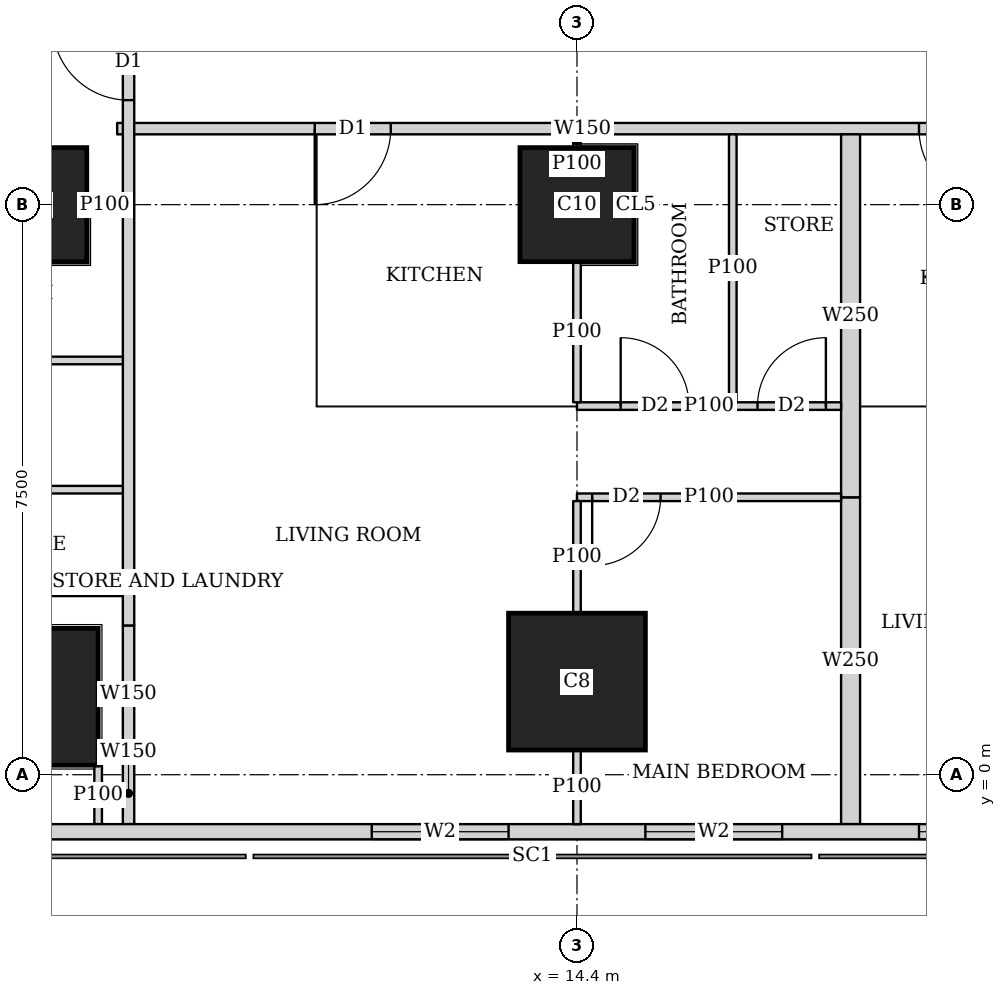
"""IFC4 building model, lengths in metres.
Left out: names, types, materials, properties, quantities, classifications, styles, units other than length and angle.
Written with IfcOpenShell. Run it as: python <this file> out.ifc"""

import sys

from ifc_helpers import new_model, si_unit, direction, frame, frame_2d, origin, origin_2d, place, context, subcontext, project, spatial, rectangle, extrude, element, fill, save


model = new_model("IFC4")
c1 = context("Model", 3, precision=1e-05, world=origin(), true_north=direction((0.0, 1.0)))
c2 = subcontext(c1, "Body", "Model", "MODEL_VIEW")
j1 = project(units=[si_unit("LENGTHUNIT", "METRE"), si_unit("PLANEANGLEUNIT", "RADIAN")], contexts=[c1])
p1 = place(None, origin())
s1 = spatial("IfcSite", under=j1, at=p1, CompositionType="ELEMENT")
p2 = place(p1, origin())
s2 = spatial("IfcBuilding", under=s1, at=p2, CompositionType="ELEMENT")
p3 = place(p2, frame((0.0, 0.0, 135.8)))
s3 = spatial("IfcBuildingStorey", under=s2, at=p3, CompositionType="ELEMENT", Elevation=135.8)
for number, where, z_axis, x_axis in (
    (1, (7.2, 1.025, 0.0), (0.0, 0.0, 1.0), (1.0, 0.0, 0.0)),
    (2, (14.4, 1.225, 0.0), (0.0, 0.0, 1.0), (1.0, 0.0, 0.0)),
):
    element("IfcColumn", number, at=place(p3, frame(where, z_axis=z_axis, x_axis=x_axis)), inside=s3, PredefinedType="COLUMN", context=c2, shape_type="SweptSolid", body=[
        extrude(rectangle(XDim=1.8, YDim=1.8, at=origin_2d()), origin(), (0.0, 0.0, 1.0), 3.75),
    ])
for number, where, z_axis, x_axis in (
    (3, (7.2, 7.5, 0.0), (0.0, 0.0, 1.0), (1.0, 0.0, 0.0)),
    (4, (14.4, 7.5, 0.0), (0.0, 0.0, 1.0), (1.0, 0.0, 0.0)),
):
    element("IfcColumn", number, at=place(p3, frame(where, z_axis=z_axis, x_axis=x_axis)), inside=s3, PredefinedType="COLUMN", context=c2, shape_type="SweptSolid", body=[
        extrude(rectangle(XDim=1.5, YDim=1.5, at=origin_2d()), origin(), (0.0, 0.0, 1.0), 3.75),
    ])
p4 = place(p3, frame((2.163, -0.75, 0.0), z_axis=(0.0, 0.0, 1.0), x_axis=(1.0, 0.0, 0.0)))
e5 = element("IfcWall", 5, at=p4, inside=s3, PredefinedType="SOLIDWALL", context=c2, shape_type="SweptSolid", body=[
    extrude(rectangle(XDim=45.628, YDim=0.2, at=frame_2d((22.814, 0.0))), origin(), (0.0, 0.0, 1.0), 3.5),
])
p5 = place(p4, frame((9.537, 0.0, 0.9)))
e6 = element("IfcOpeningElement", 6, at=p5, cuts=e5, PredefinedType="OPENING", context=c2, shape_type="SweptSolid", body=[
    extrude(rectangle(XDim=1.8, YDim=1.5, at=frame_2d((0.9, 0.75))), frame((0.0, 0.11, 0.0), z_axis=(0.0, -1.0, 0.0), x_axis=(1.0, 0.0, 0.0)), (0.0, 0.0, 1.0), 0.22),
])
p6 = place(p4, frame((13.137, 0.0, 0.9)))
e7 = element("IfcOpeningElement", 7, at=p6, cuts=e5, PredefinedType="OPENING", context=c2, shape_type="SweptSolid", body=[
    extrude(rectangle(XDim=1.8, YDim=1.5, at=frame_2d((0.9, 0.75))), frame((0.0, 0.11, 0.0), z_axis=(0.0, -1.0, 0.0), x_axis=(1.0, 0.0, 0.0)), (0.0, 0.0, 1.0), 0.22),
])
p7 = place(p4, frame((16.737, 0.0, 0.9)))
e8 = element("IfcOpeningElement", 8, at=p7, cuts=e5, PredefinedType="OPENING", context=c2, shape_type="SweptSolid", body=[
    extrude(rectangle(XDim=1.8, YDim=1.5, at=frame_2d((0.9, 0.75))), frame((0.0, 0.11, 0.0), z_axis=(0.0, -1.0, 0.0), x_axis=(1.0, 0.0, 0.0)), (0.0, 0.0, 1.0), 0.22),
])
p8 = place(p4, frame((20.337, 0.0, 0.9)))
e9 = element("IfcOpeningElement", 9, at=p8, cuts=e5, PredefinedType="OPENING", context=c2, shape_type="SweptSolid", body=[
    extrude(rectangle(XDim=1.8, YDim=1.5, at=frame_2d((0.9, 0.75))), frame((0.0, 0.11, 0.0), z_axis=(0.0, -1.0, 0.0), x_axis=(1.0, 0.0, 0.0)), (0.0, 0.0, 1.0), 0.22),
])
p9 = place(p4, frame((23.937, 0.0, 0.9)))
e10 = element("IfcOpeningElement", 10, at=p9, cuts=e5, PredefinedType="OPENING", context=c2, shape_type="SweptSolid", body=[
    extrude(rectangle(XDim=1.8, YDim=1.5, at=frame_2d((0.9, 0.75))), frame((0.0, 0.11, 0.0), z_axis=(0.0, -1.0, 0.0), x_axis=(1.0, 0.0, 0.0)), (0.0, 0.0, 1.0), 0.22),
])
p10 = place(p4, frame((27.537, 0.0, 0.9)))
e11 = element("IfcOpeningElement", 11, at=p10, cuts=e5, PredefinedType="OPENING", context=c2, shape_type="SweptSolid", body=[
    extrude(rectangle(XDim=1.8, YDim=1.5, at=frame_2d((0.9, 0.75))), frame((0.0, 0.11, 0.0), z_axis=(0.0, -1.0, 0.0), x_axis=(1.0, 0.0, 0.0)), (0.0, 0.0, 1.0), 0.22),
])
p11 = place(p4, frame((31.137, 0.0, 0.9)))
e12 = element("IfcOpeningElement", 12, at=p11, cuts=e5, PredefinedType="OPENING", context=c2, shape_type="SweptSolid", body=[
    extrude(rectangle(XDim=1.8, YDim=1.5, at=frame_2d((0.9, 0.75))), frame((0.0, 0.11, 0.0), z_axis=(0.0, -1.0, 0.0), x_axis=(1.0, 0.0, 0.0)), (0.0, 0.0, 1.0), 0.22),
])
p12 = place(p4, frame((34.737, 0.0, 0.9)))
e13 = element("IfcOpeningElement", 13, at=p12, cuts=e5, PredefinedType="OPENING", context=c2, shape_type="SweptSolid", body=[
    extrude(rectangle(XDim=1.8, YDim=1.5, at=frame_2d((0.9, 0.75))), frame((0.0, 0.11, 0.0), z_axis=(0.0, -1.0, 0.0), x_axis=(1.0, 0.0, 0.0)), (0.0, 0.0, 1.0), 0.22),
])
p13 = place(p3, frame((8.5, -0.65, 0.0), z_axis=(0.0, 0.0, 1.0), x_axis=(0.0, 1.0, 0.0)))
e14 = element("IfcWall", 14, at=p13, inside=s3, PredefinedType="SOLIDWALL", context=c2, shape_type="SweptSolid", body=[
    extrude(rectangle(XDim=0.809, YDim=0.15, at=frame_2d((0.404, 0.0))), origin(), (0.0, 0.0, 1.0), 3.5),
])
p14 = place(p3, frame((8.5, 0.159, 0.0), z_axis=(0.0, 0.0, 1.0), x_axis=(0.0, 1.0, 0.0)))
e15 = element("IfcWall", 15, at=p14, inside=s3, PredefinedType="SOLIDWALL", context=c2, shape_type="SweptSolid", body=[
    extrude(rectangle(XDim=1.805, YDim=0.15, at=frame_2d((0.903, 0.0))), origin(), (0.0, 0.0, 1.0), 2.1),
])
p15 = place(p3, frame((8.5, 1.964, 0.0), z_axis=(0.0, 0.0, 1.0), x_axis=(0.0, 1.0, 0.0)))
e16 = element("IfcWall", 16, at=p15, inside=s3, PredefinedType="SOLIDWALL", context=c2, shape_type="SweptSolid", body=[
    extrude(rectangle(XDim=41.097, YDim=0.15, at=frame_2d((20.548, 0.0))), origin(), (0.0, 0.0, 1.0), 3.5),
])
p16 = place(p15, frame((6.911, 0.0, 0.0)))
e17 = element("IfcOpeningElement", 17, at=p16, cuts=e16, PredefinedType="OPENING", context=c2, shape_type="SweptSolid", body=[
    extrude(rectangle(XDim=1.0, YDim=2.1, at=frame_2d((0.5, 1.05))), frame((0.0, 0.085, 0.0), z_axis=(0.0, -1.0, 0.0), x_axis=(1.0, 0.0, 0.0)), (0.0, 0.0, 1.0), 0.17),
])
p17 = place(p15, frame((10.661, 0.0, 0.0)))
e18 = element("IfcOpeningElement", 18, at=p17, cuts=e16, PredefinedType="OPENING", context=c2, shape_type="SweptSolid", body=[
    extrude(rectangle(XDim=1.0, YDim=2.1, at=frame_2d((0.5, 1.05))), frame((0.0, 0.085, 0.0), z_axis=(0.0, -1.0, 0.0), x_axis=(1.0, 0.0, 0.0)), (0.0, 0.0, 1.0), 0.17),
])
p18 = place(p15, frame((25.661, 0.0, 0.0)))
e19 = element("IfcOpeningElement", 19, at=p18, cuts=e16, PredefinedType="OPENING", context=c2, shape_type="SweptSolid", body=[
    extrude(rectangle(XDim=1.0, YDim=2.1, at=frame_2d((0.5, 1.05))), frame((0.0, 0.085, 0.0), z_axis=(0.0, -1.0, 0.0), x_axis=(1.0, 0.0, 0.0)), (0.0, 0.0, 1.0), 0.17),
])
p19 = place(p15, frame((33.161, 0.0, 0.0)))
e20 = element("IfcOpeningElement", 20, at=p19, cuts=e16, PredefinedType="OPENING", context=c2, shape_type="SweptSolid", body=[
    extrude(rectangle(XDim=1.0, YDim=2.1, at=frame_2d((0.5, 1.05))), frame((0.0, 0.085, 0.0), z_axis=(0.0, -1.0, 0.0), x_axis=(1.0, 0.0, 0.0)), (0.0, 0.0, 1.0), 0.17),
])
p20 = place(p3, frame((20.599, 8.5, 0.0), z_axis=(0.0, 0.0, 1.0), x_axis=(-1.0, 0.0, 0.0)))
e21 = element("IfcWall", 21, at=p20, inside=s3, PredefinedType="SOLIDWALL", context=c2, shape_type="SweptSolid", body=[
    extrude(rectangle(XDim=12.249, YDim=0.15, at=frame_2d((6.125, 0.0))), origin(), (0.0, 0.0, 1.0), 3.5),
])
p21 = place(p20, frame((8.649, 0.0, 0.0)))
e22 = element("IfcOpeningElement", 22, at=p21, cuts=e21, PredefinedType="OPENING", context=c2, shape_type="SweptSolid", body=[
    extrude(rectangle(XDim=1.0, YDim=2.1, at=frame_2d((0.5, 1.05))), frame((0.0, 0.085, 0.0), z_axis=(0.0, -1.0, 0.0), x_axis=(1.0, 0.0, 0.0)), (0.0, 0.0, 1.0), 0.17),
])
p22 = place(p20, frame((0.699, 0.0, 0.0)))
e23 = element("IfcOpeningElement", 23, at=p22, cuts=e21, PredefinedType="OPENING", context=c2, shape_type="SweptSolid", body=[
    extrude(rectangle(XDim=1.0, YDim=2.1, at=frame_2d((0.5, 1.05))), frame((0.0, 0.085, 0.0), z_axis=(0.0, -1.0, 0.0), x_axis=(1.0, 0.0, 0.0)), (0.0, 0.0, 1.0), 0.17),
])
p23 = place(p3, frame((8.1, 0.124, 0.0), z_axis=(0.0, 0.0, 1.0), x_axis=(0.0, -1.0, 0.0)))
e24 = element("IfcWall", 24, at=p23, inside=s3, PredefinedType="PARTITIONING", context=c2, shape_type="SweptSolid", body=[
    extrude(rectangle(XDim=0.774, YDim=0.1, at=frame_2d((0.387, 0.0))), origin(), (0.0, 0.0, 1.0), 3.5),
])
p24 = place(p3, frame((4.9, 3.75, 0.0), z_axis=(0.0, 0.0, 1.0), x_axis=(1.0, 0.0, 0.0)))
e25 = element("IfcWall", 25, at=p24, inside=s3, PredefinedType="PARTITIONING", context=c2, shape_type="SweptSolid", body=[
    extrude(rectangle(XDim=3.525, YDim=0.1, at=frame_2d((1.763, 0.0))), origin(), (0.0, 0.0, 1.0), 3.5),
])
p25 = place(p3, frame((7.951, 7.5, 0.0), z_axis=(0.0, 0.0, 1.0), x_axis=(1.0, 0.0, 0.0)))
e26 = element("IfcWall", 26, at=p25, inside=s3, PredefinedType="PARTITIONING", context=c2, shape_type="SweptSolid", body=[
    extrude(rectangle(XDim=0.474, YDim=0.1, at=frame_2d((0.237, 0.0))), origin(), (0.0, 0.0, 1.0), 3.5),
])
p26 = place(p3, frame((4.9, 5.45, 0.0), z_axis=(0.0, 0.0, 1.0), x_axis=(1.0, 0.0, 0.0)))
e27 = element("IfcWall", 27, at=p26, inside=s3, PredefinedType="PARTITIONING", context=c2, shape_type="SweptSolid", body=[
    extrude(rectangle(XDim=3.525, YDim=0.1, at=frame_2d((1.763, 0.0))), origin(), (0.0, 0.0, 1.0), 3.5),
])
p27 = place(p3, frame((17.875, 3.65, 0.0), z_axis=(0.0, 0.0, 1.0), x_axis=(-1.0, 0.0, 0.0)))
e28 = element("IfcWall", 28, at=p27, inside=s3, PredefinedType="PARTITIONING", context=c2, shape_type="SweptSolid", body=[
    extrude(rectangle(XDim=3.475, YDim=0.1, at=frame_2d((1.738, 0.0))), origin(), (0.0, 0.0, 1.0), 3.5),
])
p28 = place(p27, frame((2.375, 0.0, 0.0)))
e29 = element("IfcOpeningElement", 29, at=p28, cuts=e28, PredefinedType="OPENING", context=c2, shape_type="SweptSolid", body=[
    extrude(rectangle(XDim=0.9, YDim=2.1, at=frame_2d((0.45, 1.05))), frame((0.0, 0.06, 0.0), z_axis=(0.0, -1.0, 0.0), x_axis=(1.0, 0.0, 0.0)), (0.0, 0.0, 1.0), 0.12),
])
p29 = place(p3, frame((17.875, 4.85, 0.0), z_axis=(0.0, 0.0, 1.0), x_axis=(-1.0, 0.0, 0.0)))
e30 = element("IfcWall", 30, at=p29, inside=s3, PredefinedType="PARTITIONING", context=c2, shape_type="SweptSolid", body=[
    extrude(rectangle(XDim=3.475, YDim=0.1, at=frame_2d((1.738, 0.0))), origin(), (0.0, 0.0, 1.0), 3.5),
])
p30 = place(p29, frame((2.0, 0.0, 0.0)))
e31 = element("IfcOpeningElement", 31, at=p30, cuts=e30, PredefinedType="OPENING", context=c2, shape_type="SweptSolid", body=[
    extrude(rectangle(XDim=0.9, YDim=2.1, at=frame_2d((0.45, 1.05))), frame((0.0, 0.06, 0.0), z_axis=(0.0, -1.0, 0.0), x_axis=(1.0, 0.0, 0.0)), (0.0, 0.0, 1.0), 0.12),
])
p31 = place(p29, frame((0.2, 0.0, 0.0)))
e32 = element("IfcOpeningElement", 32, at=p31, cuts=e30, PredefinedType="OPENING", context=c2, shape_type="SweptSolid", body=[
    extrude(rectangle(XDim=0.9, YDim=2.1, at=frame_2d((0.45, 1.05))), frame((0.0, 0.06, 0.0), z_axis=(0.0, -1.0, 0.0), x_axis=(1.0, 0.0, 0.0)), (0.0, 0.0, 1.0), 0.12),
])
p32 = place(p3, frame((14.4, -0.65, 0.0), z_axis=(0.0, 0.0, 1.0), x_axis=(0.0, 1.0, 0.0)))
e33 = element("IfcWall", 33, at=p32, inside=s3, PredefinedType="PARTITIONING", context=c2, shape_type="SweptSolid", body=[
    extrude(rectangle(XDim=0.974, YDim=0.1, at=frame_2d((0.487, 0.0))), origin(), (0.0, 0.0, 1.0), 3.5),
])
p33 = place(p3, frame((14.4, 2.126, 0.0), z_axis=(0.0, 0.0, 1.0), x_axis=(0.0, 1.0, 0.0)))
e34 = element("IfcWall", 34, at=p33, inside=s3, PredefinedType="PARTITIONING", context=c2, shape_type="SweptSolid", body=[
    extrude(rectangle(XDim=1.474, YDim=0.1, at=frame_2d((0.737, 0.0))), origin(), (0.0, 0.0, 1.0), 3.5),
])
p34 = place(p3, frame((14.4, 4.9, 0.0), z_axis=(0.0, 0.0, 1.0), x_axis=(0.0, 1.0, 0.0)))
e35 = element("IfcWall", 35, at=p34, inside=s3, PredefinedType="PARTITIONING", context=c2, shape_type="SweptSolid", body=[
    extrude(rectangle(XDim=1.849, YDim=0.1, at=frame_2d((0.925, 0.0))), origin(), (0.0, 0.0, 1.0), 3.5),
])
p35 = place(p3, frame((14.4, 8.251, 0.0), z_axis=(0.0, 0.0, 1.0), x_axis=(0.0, 1.0, 0.0)))
e36 = element("IfcWall", 36, at=p35, inside=s3, PredefinedType="PARTITIONING", context=c2, shape_type="SweptSolid", body=[
    extrude(rectangle(XDim=0.174, YDim=0.1, at=frame_2d((0.087, 0.0))), origin(), (0.0, 0.0, 1.0), 3.5),
])
p36 = place(p3, frame((16.45, 4.9, 0.0), z_axis=(0.0, 0.0, 1.0), x_axis=(0.0, 1.0, 0.0)))
e37 = element("IfcWall", 37, at=p36, inside=s3, PredefinedType="PARTITIONING", context=c2, shape_type="SweptSolid", body=[
    extrude(rectangle(XDim=3.525, YDim=0.1, at=frame_2d((1.763, 0.0))), origin(), (0.0, 0.0, 1.0), 3.5),
])
p37 = place(p3, frame((18.0, -0.65, 0.0), z_axis=(0.0, 0.0, 1.0), x_axis=(0.0, 1.0, 0.0)))
e38 = element("IfcWall", 38, at=p37, inside=s3, PredefinedType="SOLIDWALL", context=c2, shape_type="SweptSolid", body=[
    extrude(rectangle(XDim=4.3, YDim=0.25, at=frame_2d((2.15, 0.0))), origin(), (0.0, 0.0, 1.0), 2.1),
])
p38 = place(p3, frame((18.0, 3.65, 0.0), z_axis=(0.0, 0.0, 1.0), x_axis=(0.0, 1.0, 0.0)))
e39 = element("IfcWall", 39, at=p38, inside=s3, PredefinedType="SOLIDWALL", context=c2, shape_type="SweptSolid", body=[
    extrude(rectangle(XDim=4.775, YDim=0.25, at=frame_2d((2.388, 0.0))), origin(), (0.0, 0.0, 1.0), 3.5),
])
p39 = place(p3, frame((5.467, 2.4, 0.0), z_axis=(0.0, 0.0, 1.0), x_axis=(1.0, 0.0, 0.0)))
e40 = element("IfcWall", 40, at=p39, inside=s3, PredefinedType="PARTITIONING", context=c2, shape_type="SweptSolid", body=[
    extrude(rectangle(XDim=2.958, YDim=0.1, at=frame_2d((1.479, 0.0))), origin(), (0.0, 0.0, 1.0), 3.5),
])
p40 = place(p39, frame((0.108, 0.0, 0.0)))
e41 = element("IfcOpeningElement", 41, at=p40, cuts=e40, PredefinedType="OPENING", context=c2, shape_type="SweptSolid", body=[
    extrude(rectangle(XDim=0.9, YDim=2.1, at=frame_2d((0.45, 1.05))), frame((0.0, 0.06, 0.0), z_axis=(0.0, -1.0, 0.0), x_axis=(1.0, 0.0, 0.0)), (0.0, 0.0, 1.0), 0.12),
])
p41 = place(p5, origin())
e42 = element("IfcWindow", 42, at=p41, inside=s3, PartitioningType="SINGLE_PANEL", PredefinedType="WINDOW", context=c2, shape_type="SweptSolid", body=[
    extrude(rectangle(XDim=1.8, YDim=1.5, at=frame_2d((0.9, 0.75))), frame((0.0, 0.03, 0.0), z_axis=(0.0, -1.0, 0.0), x_axis=(1.0, 0.0, 0.0)), (0.0, 0.0, 1.0), 0.06),
])
fill(e6, e42)
p42 = place(p6, origin())
e43 = element("IfcWindow", 43, at=p42, inside=s3, PartitioningType="SINGLE_PANEL", PredefinedType="WINDOW", context=c2, shape_type="SweptSolid", body=[
    extrude(rectangle(XDim=1.8, YDim=1.5, at=frame_2d((0.9, 0.75))), frame((0.0, 0.03, 0.0), z_axis=(0.0, -1.0, 0.0), x_axis=(1.0, 0.0, 0.0)), (0.0, 0.0, 1.0), 0.06),
])
fill(e7, e43)
p43 = place(p7, origin())
e44 = element("IfcWindow", 44, at=p43, inside=s3, PartitioningType="SINGLE_PANEL", PredefinedType="WINDOW", context=c2, shape_type="SweptSolid", body=[
    extrude(rectangle(XDim=1.8, YDim=1.5, at=frame_2d((0.9, 0.75))), frame((0.0, 0.03, 0.0), z_axis=(0.0, -1.0, 0.0), x_axis=(1.0, 0.0, 0.0)), (0.0, 0.0, 1.0), 0.06),
])
fill(e8, e44)
p44 = place(p16, origin())
e45 = element("IfcDoor", 45, at=p44, inside=s3, OperationType="SINGLE_SWING_RIGHT", PredefinedType="DOOR", context=c2, shape_type="SweptSolid", body=[
    extrude(rectangle(XDim=1.0, YDim=2.1, at=frame_2d((0.5, 1.05))), frame((0.0, 0.025, 0.0), z_axis=(0.0, -1.0, 0.0), x_axis=(1.0, 0.0, 0.0)), (0.0, 0.0, 1.0), 0.05),
])
fill(e17, e45)
p45 = place(p28, origin())
e46 = element("IfcDoor", 46, at=p45, inside=s3, OperationType="SINGLE_SWING_RIGHT", PredefinedType="DOOR", context=c2, shape_type="SweptSolid", body=[
    extrude(rectangle(XDim=0.9, YDim=2.1, at=frame_2d((0.45, 1.05))), frame((0.0, 0.025, 0.0), z_axis=(0.0, -1.0, 0.0), x_axis=(1.0, 0.0, 0.0)), (0.0, 0.0, 1.0), 0.05),
])
fill(e29, e46)
p46 = place(p30, origin())
e47 = element("IfcDoor", 47, at=p46, inside=s3, OperationType="SINGLE_SWING_LEFT", PredefinedType="DOOR", context=c2, shape_type="SweptSolid", body=[
    extrude(rectangle(XDim=0.9, YDim=2.1, at=frame_2d((0.45, 1.05))), frame((0.0, 0.025, 0.0), z_axis=(0.0, -1.0, 0.0), x_axis=(1.0, 0.0, 0.0)), (0.0, 0.0, 1.0), 0.05),
])
fill(e31, e47)
p47 = place(p31, origin())
e48 = element("IfcDoor", 48, at=p47, inside=s3, OperationType="SINGLE_SWING_RIGHT", PredefinedType="DOOR", context=c2, shape_type="SweptSolid", body=[
    extrude(rectangle(XDim=0.9, YDim=2.1, at=frame_2d((0.45, 1.05))), frame((0.0, 0.025, 0.0), z_axis=(0.0, -1.0, 0.0), x_axis=(1.0, 0.0, 0.0)), (0.0, 0.0, 1.0), 0.05),
])
fill(e32, e48)
p48 = place(p21, origin())
e49 = element("IfcDoor", 49, at=p48, inside=s3, OperationType="SINGLE_SWING_RIGHT", PredefinedType="DOOR", context=c2, shape_type="SweptSolid", body=[
    extrude(rectangle(XDim=1.0, YDim=2.1, at=frame_2d((0.5, 1.05))), frame((0.0, 0.025, 0.0), z_axis=(0.0, -1.0, 0.0), x_axis=(1.0, 0.0, 0.0)), (0.0, 0.0, 1.0), 0.05),
])
fill(e22, e49)
p49 = place(p22, origin())
e50 = element("IfcDoor", 50, at=p49, inside=s3, OperationType="SINGLE_SWING_LEFT", PredefinedType="DOOR", context=c2, shape_type="SweptSolid", body=[
    extrude(rectangle(XDim=1.0, YDim=2.1, at=frame_2d((0.5, 1.05))), frame((0.0, 0.025, 0.0), z_axis=(0.0, -1.0, 0.0), x_axis=(1.0, 0.0, 0.0)), (0.0, 0.0, 1.0), 0.05),
])
fill(e23, e50)
save(model, sys.argv[1])
